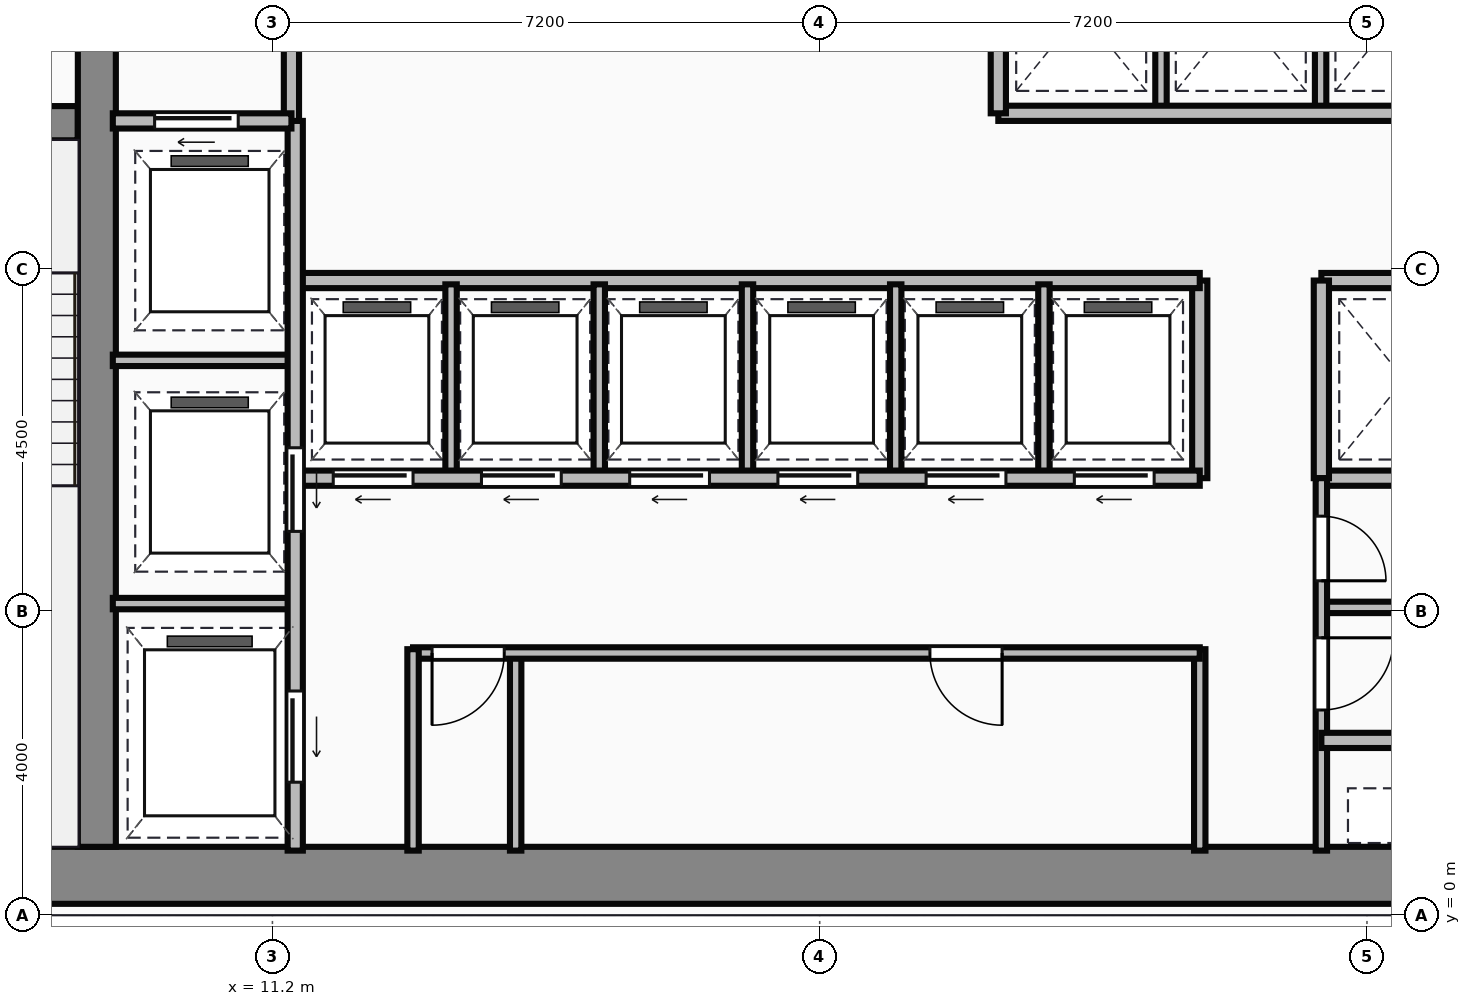
"""IFC4 building model, lengths in metres.
Left out: names, types, materials, properties, quantities, classifications, styles, units other than length and angle.
Written with IfcOpenShell. Run it as: python <this file> out.ifc"""

import sys

from ifc_helpers import new_model, si_unit, direction, frame, frame_2d, origin, place, context, subcontext, project, spatial, rectangle, extrude, source, transform, mapped, element, fill, save


model = new_model("IFC4")
c1 = context("Model", 3, precision=1e-05, world=origin(), true_north=direction((0.0, 1.0)))
c2 = subcontext(c1, "Body", "Model", "MODEL_VIEW")
j1 = project(units=[si_unit("LENGTHUNIT", "METRE"), si_unit("PLANEANGLEUNIT", "RADIAN")], contexts=[c1])
p1 = place(None, origin())
s1 = spatial("IfcSite", under=j1, at=p1, CompositionType="ELEMENT")
p2 = place(p1, origin())
s2 = spatial("IfcBuilding", under=s1, at=p2, CompositionType="ELEMENT")
p3 = place(p2, frame((0.0, 0.0, 151.55)))
s3 = spatial("IfcBuildingStorey", under=s2, at=p3, CompositionType="ELEMENT", Elevation=151.55)
m1 = source(origin(), c2, "Body", "SweptSolid", [
    extrude(rectangle(XDim=29.5, YDim=0.75, at=frame_2d((14.75, 0.0))), origin(), (0.0, 0.0, 1.0), 3.65),
])
p4 = place(p3, frame((4.5, 0.525, 0.0), z_axis=(0.0, 0.0, 1.0), x_axis=(1.0, 0.0, 0.0)))
e1 = element("IfcWall", 1, at=p4, inside=s3, PredefinedType="SHEAR", context=c2, shape_type="MappedRepresentation", body=[
    mapped(m1, transform((0.0, 0.0, 0.0))),
])
m2 = source(origin(), c2, "Body", "SweptSolid", [
    extrude(rectangle(XDim=12.35, YDim=0.5, at=frame_2d((6.175, 0.0))), origin(), (0.0, 0.0, 1.0), 3.65),
])
p5 = place(p3, frame((8.89, 0.9, 0.0), z_axis=(0.0, 0.0, 1.0), x_axis=(0.0, 1.0, 0.0)))
e2 = element("IfcWall", 2, at=p5, inside=s3, PredefinedType="SHEAR", context=c2, shape_type="MappedRepresentation", body=[
    mapped(m2, transform((0.0, 0.0, 0.0))),
])
m3 = source(origin(), c2, "Body", "SweptSolid", [
    extrude(rectangle(XDim=3.39, YDim=0.45, at=frame_2d((1.695, 0.0))), origin(), (0.0, 0.0, 1.0), 3.65),
])
p6 = place(p3, frame((5.25, 10.42, 0.0), z_axis=(0.0, 0.0, 1.0), x_axis=(1.0, 0.0, 0.0)))
e3 = element("IfcWall", 3, at=p6, inside=s3, PredefinedType="SHEAR", context=c2, shape_type="MappedRepresentation", body=[
    mapped(m3, transform((0.0, 0.0, 0.0))),
])
p7 = place(p6, frame((1.05, 0.0, 0.0)))
e4 = element("IfcOpeningElement", 4, at=p7, cuts=e3, PredefinedType="OPENING", context=c2, shape_type="SweptSolid", body=[
    extrude(rectangle(XDim=1.1, YDim=2.15, at=frame_2d((0.55, 1.075))), frame((0.0, 0.235, 0.0), z_axis=(0.0, -1.0, 0.0), x_axis=(1.0, 0.0, 0.0)), (0.0, 0.0, 1.0), 0.47),
])
m4 = source(origin(), c2, "Body", "SweptSolid", [
    extrude(rectangle(XDim=3.18, YDim=0.2, at=frame_2d((1.59, 0.0))), origin(), (0.0, 0.0, 1.0), 3.4),
])
p8 = place(p3, frame((11.45, 10.42, 0.0), z_axis=(0.0, 0.0, 1.0), x_axis=(0.0, 1.0, 0.0)))
e5 = element("IfcWall", 5, at=p8, inside=s3, PredefinedType="PARTITIONING", context=c2, shape_type="MappedRepresentation", body=[
    mapped(m4, transform((0.0, 0.0, 0.0))),
])
m5 = source(origin(), c2, "Body", "SweptSolid", [
    extrude(rectangle(XDim=2.35, YDim=0.2, at=frame_2d((1.175, 0.0))), origin(), (0.0, 0.0, 1.0), 3.4),
])
p9 = place(p3, frame((9.1, 10.45, 0.0), z_axis=(0.0, 0.0, 1.0), x_axis=(1.0, 0.0, 0.0)))
e6 = element("IfcWall", 6, at=p9, inside=s3, PredefinedType="PARTITIONING", context=c2, shape_type="MappedRepresentation", body=[
    mapped(m5, transform((0.0, 0.0, 0.0))),
])
p10 = place(p9, frame((0.55, 0.0, 0.0)))
e7 = element("IfcOpeningElement", 7, at=p10, cuts=e6, PredefinedType="OPENING", context=c2, shape_type="SweptSolid", body=[
    extrude(rectangle(XDim=1.1, YDim=2.15, at=frame_2d((0.55, 1.075))), frame((0.0, 0.11, 0.0), z_axis=(0.0, -1.0, 0.0), x_axis=(1.0, 0.0, 0.0)), (0.0, 0.0, 1.0), 0.22),
])
m6 = source(origin(), c2, "Body", "SweptSolid", [
    extrude(rectangle(XDim=9.6, YDim=0.2, at=frame_2d((4.8, 0.0))), origin(), (0.0, 0.0, 1.0), 3.4),
])
p11 = place(p3, frame((11.5, 0.85, 0.0), z_axis=(0.0, 0.0, 1.0), x_axis=(0.0, 1.0, 0.0)))
e8 = element("IfcWall", 8, at=p11, inside=s3, PredefinedType="PARTITIONING", context=c2, shape_type="MappedRepresentation", body=[
    mapped(m6, transform((0.0, 0.0, 0.0))),
])
p12 = place(p11, frame((4.2, 0.0, 0.0)))
e9 = element("IfcOpeningElement", 9, at=p12, cuts=e8, PredefinedType="OPENING", context=c2, shape_type="SweptSolid", body=[
    extrude(rectangle(XDim=1.1, YDim=2.15, at=frame_2d((0.55, 1.075))), frame((0.0, 0.11, 0.0), z_axis=(0.0, -1.0, 0.0), x_axis=(1.0, 0.0, 0.0)), (0.0, 0.0, 1.0), 0.22),
])
p13 = place(p11, frame((0.9, 0.0, 0.0)))
e10 = element("IfcOpeningElement", 10, at=p13, cuts=e8, PredefinedType="OPENING", context=c2, shape_type="SweptSolid", body=[
    extrude(rectangle(XDim=1.2, YDim=2.15, at=frame_2d((0.6, 1.075))), frame((0.0, 0.11, 0.0), z_axis=(0.0, -1.0, 0.0), x_axis=(1.0, 0.0, 0.0)), (0.0, 0.0, 1.0), 0.22),
])
m7 = source(origin(), c2, "Body", "SweptSolid", [
    extrude(rectangle(XDim=2.4, YDim=0.15, at=frame_2d((1.2, 0.0))), origin(), (0.0, 0.0, 1.0), 3.4),
])
for number, where, z_axis, x_axis in (
    (11, (9.1, 4.1, 0.0), (0.0, 0.0, 1.0), (1.0, 0.0, 0.0)),
    (12, (9.1, 7.3, 0.0), (0.0, 0.0, 1.0), (1.0, 0.0, 0.0)),
):
    element("IfcWall", number, at=place(p3, frame(where, z_axis=z_axis, x_axis=x_axis)), inside=s3, PredefinedType="PARTITIONING", context=c2, shape_type="MappedRepresentation", body=[
        mapped(m7, transform((0.0, 0.0, 0.0))),
    ])
m8 = source(origin(), c2, "Body", "SweptSolid", [
    extrude(rectangle(XDim=2.65, YDim=0.15, at=frame_2d((1.325, 0.0))), origin(), (0.0, 0.0, 1.0), 3.4),
])
p14 = place(p3, frame((13.05, 0.85, 0.0), z_axis=(0.0, 0.0, 1.0), x_axis=(0.0, 1.0, 0.0)))
e13 = element("IfcWall", 13, at=p14, inside=s3, PredefinedType="PARTITIONING", context=c2, shape_type="MappedRepresentation", body=[
    mapped(m8, transform((0.0, 0.0, 0.0))),
])
m9 = source(origin(), c2, "Body", "SweptSolid", [
    extrude(rectangle(XDim=10.35, YDim=0.15, at=frame_2d((5.175, 0.0))), origin(), (0.0, 0.0, 1.0), 3.4),
])
p15 = place(p3, frame((13.05, 3.45, 0.0), z_axis=(0.0, 0.0, 1.0), x_axis=(1.0, 0.0, 0.0)))
e14 = element("IfcWall", 14, at=p15, inside=s3, PredefinedType="PARTITIONING", context=c2, shape_type="MappedRepresentation", body=[
    mapped(m9, transform((0.0, 0.0, 0.0))),
])
p16 = place(p15, frame((0.25, 0.0, 0.0)))
e15 = element("IfcOpeningElement", 15, at=p16, cuts=e14, PredefinedType="OPENING", context=c2, shape_type="SweptSolid", body=[
    extrude(rectangle(XDim=0.95, YDim=2.15, at=frame_2d((0.475, 1.075))), frame((0.0, 0.085, 0.0), z_axis=(0.0, -1.0, 0.0), x_axis=(1.0, 0.0, 0.0)), (0.0, 0.0, 1.0), 0.17),
])
p17 = place(p15, frame((6.8, 0.0, 0.0)))
e16 = element("IfcOpeningElement", 16, at=p17, cuts=e14, PredefinedType="OPENING", context=c2, shape_type="SweptSolid", body=[
    extrude(rectangle(XDim=0.95, YDim=2.15, at=frame_2d((0.475, 1.075))), frame((0.0, 0.085, 0.0), z_axis=(0.0, -1.0, 0.0), x_axis=(1.0, 0.0, 0.0)), (0.0, 0.0, 1.0), 0.17),
])
p18 = place(p3, frame((23.4, 0.85, 0.0), z_axis=(0.0, 0.0, 1.0), x_axis=(0.0, 1.0, 0.0)))
e17 = element("IfcWall", 17, at=p18, inside=s3, PredefinedType="PARTITIONING", context=c2, shape_type="MappedRepresentation", body=[
    mapped(m8, transform((0.0, 0.0, 0.0))),
])
m10 = source(origin(), c2, "Body", "SweptSolid", [
    extrude(rectangle(XDim=2.6, YDim=0.15, at=frame_2d((1.3, 0.0))), origin(), (0.0, 0.0, 1.0), 3.4),
])
p19 = place(p3, frame((14.4, 0.85, 0.0), z_axis=(0.0, 0.0, 1.0), x_axis=(0.0, 1.0, 0.0)))
e18 = element("IfcWall", 18, at=p19, inside=s3, PredefinedType="PARTITIONING", context=c2, shape_type="MappedRepresentation", body=[
    mapped(m10, transform((0.0, 0.0, 0.0))),
])
m11 = source(origin(), c2, "Body", "SweptSolid", [
    extrude(rectangle(XDim=11.85, YDim=0.2, at=frame_2d((5.925, 0.0))), origin(), (0.0, 0.0, 1.0), 3.4),
])
p20 = place(p3, frame((11.55, 5.75, 0.0), z_axis=(0.0, 0.0, 1.0), x_axis=(1.0, 0.0, 0.0)))
e19 = element("IfcWall", 19, at=p20, inside=s3, PredefinedType="PARTITIONING", context=c2, shape_type="MappedRepresentation", body=[
    mapped(m11, transform((0.0, 0.0, 0.0))),
])
p21 = place(p20, frame((0.45, 0.0, 0.0)))
e20 = element("IfcOpeningElement", 20, at=p21, cuts=e19, PredefinedType="OPENING", context=c2, shape_type="SweptSolid", body=[
    extrude(rectangle(XDim=1.05, YDim=2.15, at=frame_2d((0.525, 1.075))), frame((0.0, 0.11, 0.0), z_axis=(0.0, -1.0, 0.0), x_axis=(1.0, 0.0, 0.0)), (0.0, 0.0, 1.0), 0.22),
])
p22 = place(p20, frame((2.4, 0.0, 0.0)))
e21 = element("IfcOpeningElement", 21, at=p22, cuts=e19, PredefinedType="OPENING", context=c2, shape_type="SweptSolid", body=[
    extrude(rectangle(XDim=1.05, YDim=2.15, at=frame_2d((0.525, 1.075))), frame((0.0, 0.11, 0.0), z_axis=(0.0, -1.0, 0.0), x_axis=(1.0, 0.0, 0.0)), (0.0, 0.0, 1.0), 0.22),
])
p23 = place(p20, frame((4.35, 0.0, 0.0)))
e22 = element("IfcOpeningElement", 22, at=p23, cuts=e19, PredefinedType="OPENING", context=c2, shape_type="SweptSolid", body=[
    extrude(rectangle(XDim=1.05, YDim=2.15, at=frame_2d((0.525, 1.075))), frame((0.0, 0.11, 0.0), z_axis=(0.0, -1.0, 0.0), x_axis=(1.0, 0.0, 0.0)), (0.0, 0.0, 1.0), 0.22),
])
p24 = place(p20, frame((6.3, 0.0, 0.0)))
e23 = element("IfcOpeningElement", 23, at=p24, cuts=e19, PredefinedType="OPENING", context=c2, shape_type="SweptSolid", body=[
    extrude(rectangle(XDim=1.05, YDim=2.15, at=frame_2d((0.525, 1.075))), frame((0.0, 0.11, 0.0), z_axis=(0.0, -1.0, 0.0), x_axis=(1.0, 0.0, 0.0)), (0.0, 0.0, 1.0), 0.22),
])
p25 = place(p20, frame((8.25, 0.0, 0.0)))
e24 = element("IfcOpeningElement", 24, at=p25, cuts=e19, PredefinedType="OPENING", context=c2, shape_type="SweptSolid", body=[
    extrude(rectangle(XDim=1.05, YDim=2.15, at=frame_2d((0.525, 1.075))), frame((0.0, 0.11, 0.0), z_axis=(0.0, -1.0, 0.0), x_axis=(1.0, 0.0, 0.0)), (0.0, 0.0, 1.0), 0.22),
])
p26 = place(p20, frame((10.2, 0.0, 0.0)))
e25 = element("IfcOpeningElement", 25, at=p26, cuts=e19, PredefinedType="OPENING", context=c2, shape_type="SweptSolid", body=[
    extrude(rectangle(XDim=1.05, YDim=2.15, at=frame_2d((0.525, 1.075))), frame((0.0, 0.11, 0.0), z_axis=(0.0, -1.0, 0.0), x_axis=(1.0, 0.0, 0.0)), (0.0, 0.0, 1.0), 0.22),
])
p27 = place(p3, frame((11.55, 8.35, 0.0), z_axis=(0.0, 0.0, 1.0), x_axis=(1.0, 0.0, 0.0)))
e26 = element("IfcWall", 26, at=p27, inside=s3, PredefinedType="PARTITIONING", context=c2, shape_type="MappedRepresentation", body=[
    mapped(m11, transform((0.0, 0.0, 0.0))),
])
m12 = source(origin(), c2, "Body", "SweptSolid", [
    extrude(rectangle(XDim=2.6, YDim=0.2, at=frame_2d((1.3, 0.0))), origin(), (0.0, 0.0, 1.0), 3.4),
])
p28 = place(p3, frame((23.4, 5.75, 0.0), z_axis=(0.0, 0.0, 1.0), x_axis=(0.0, 1.0, 0.0)))
e27 = element("IfcWall", 27, at=p28, inside=s3, PredefinedType="PARTITIONING", context=c2, shape_type="MappedRepresentation", body=[
    mapped(m12, transform((0.0, 0.0, 0.0))),
])
m13 = source(origin(), c2, "Body", "SweptSolid", [
    extrude(rectangle(XDim=2.5, YDim=0.15, at=frame_2d((1.25, 0.0))), origin(), (0.0, 0.0, 1.0), 3.4),
])
for number, where, z_axis, x_axis in (
    (28, (13.55, 5.8, 0.0), (0.0, 0.0, 1.0), (0.0, 1.0, 0.0)),
    (29, (15.5, 5.8, 0.0), (0.0, 0.0, 1.0), (0.0, 1.0, 0.0)),
    (30, (17.45, 5.8, 0.0), (0.0, 0.0, 1.0), (0.0, 1.0, 0.0)),
    (31, (19.4, 5.8, 0.0), (0.0, 0.0, 1.0), (0.0, 1.0, 0.0)),
    (32, (21.35, 5.8, 0.0), (0.0, 0.0, 1.0), (0.0, 1.0, 0.0)),
):
    element("IfcWall", number, at=place(p3, frame(where, z_axis=z_axis, x_axis=x_axis)), inside=s3, PredefinedType="PARTITIONING", context=c2, shape_type="MappedRepresentation", body=[
        mapped(m13, transform((0.0, 0.0, 0.0))),
    ])
m14 = source(origin(), c2, "Body", "SweptSolid", [
    extrude(rectangle(XDim=8.8, YDim=0.2, at=frame_2d((4.4, 0.0))), origin(), (0.0, 0.0, 1.0), 3.4),
])
p29 = place(p3, frame((20.75, 10.55, 0.0), z_axis=(0.0, 0.0, 1.0), x_axis=(1.0, 0.0, 0.0)))
e33 = element("IfcWall", 33, at=p29, inside=s3, PredefinedType="PARTITIONING", context=c2, shape_type="MappedRepresentation", body=[
    mapped(m14, transform((0.0, 0.0, 0.0))),
])
m15 = source(origin(), c2, "Body", "SweptSolid", [
    extrude(rectangle(XDim=3.0, YDim=0.2, at=frame_2d((1.5, 0.0))), origin(), (0.0, 0.0, 1.0), 3.4),
])
p30 = place(p3, frame((20.75, 10.55, 0.0), z_axis=(0.0, 0.0, 1.0), x_axis=(0.0, 1.0, 0.0)))
e34 = element("IfcWall", 34, at=p30, inside=s3, PredefinedType="PARTITIONING", context=c2, shape_type="MappedRepresentation", body=[
    mapped(m15, transform((0.0, 0.0, 0.0))),
])
m16 = source(origin(), c2, "Body", "SweptSolid", [
    extrude(rectangle(XDim=2.85, YDim=0.15, at=frame_2d((1.425, 0.0))), origin(), (0.0, 0.0, 1.0), 3.4),
])
for number, where, z_axis, x_axis in (
    (35, (22.89, 10.6, 0.0), (0.0, 0.0, 1.0), (0.0, 1.0, 0.0)),
    (36, (24.99, 10.6, 0.0), (0.0, 0.0, 1.0), (0.0, 1.0, 0.0)),
):
    element("IfcWall", number, at=place(p3, frame(where, z_axis=z_axis, x_axis=x_axis)), inside=s3, PredefinedType="PARTITIONING", context=c2, shape_type="MappedRepresentation", body=[
        mapped(m16, transform((0.0, 0.0, 0.0))),
    ])
m17 = source(origin(), c2, "Body", "SweptSolid", [
    extrude(rectangle(XDim=4.55, YDim=0.2, at=frame_2d((2.275, 0.0))), origin(), (0.0, 0.0, 1.0), 3.4),
])
for number, where, z_axis, x_axis in (
    (37, (25.0, 8.35, 0.0), (0.0, 0.0, 1.0), (1.0, 0.0, 0.0)),
    (38, (25.0, 5.75, 0.0), (0.0, 0.0, 1.0), (1.0, 0.0, 0.0)),
):
    element("IfcWall", number, at=place(p3, frame(where, z_axis=z_axis, x_axis=x_axis)), inside=s3, PredefinedType="PARTITIONING", context=c2, shape_type="MappedRepresentation", body=[
        mapped(m17, transform((0.0, 0.0, 0.0))),
    ])
p31 = place(p3, frame((25.0, 5.75, 0.0), z_axis=(0.0, 0.0, 1.0), x_axis=(0.0, 1.0, 0.0)))
e39 = element("IfcWall", 39, at=p31, inside=s3, PredefinedType="PARTITIONING", context=c2, shape_type="MappedRepresentation", body=[
    mapped(m12, transform((0.0, 0.0, 0.0))),
])
m18 = source(origin(), c2, "Body", "SweptSolid", [
    extrude(rectangle(XDim=4.9, YDim=0.15, at=frame_2d((2.45, 0.0))), origin(), (0.0, 0.0, 1.0), 3.4),
])
p32 = place(p3, frame((25.0, 0.85, 0.0), z_axis=(0.0, 0.0, 1.0), x_axis=(0.0, 1.0, 0.0)))
e40 = element("IfcWall", 40, at=p32, inside=s3, PredefinedType="PARTITIONING", context=c2, shape_type="MappedRepresentation", body=[
    mapped(m18, transform((0.0, 0.0, 0.0))),
])
p33 = place(p32, frame((1.85, 0.0, 0.0)))
e41 = element("IfcOpeningElement", 41, at=p33, cuts=e40, PredefinedType="OPENING", context=c2, shape_type="SweptSolid", body=[
    extrude(rectangle(XDim=0.95, YDim=2.15, at=frame_2d((0.475, 1.075))), frame((0.0, 0.085, 0.0), z_axis=(0.0, -1.0, 0.0), x_axis=(1.0, 0.0, 0.0)), (0.0, 0.0, 1.0), 0.17),
])
p34 = place(p32, frame((3.55, 0.0, 0.0)))
e42 = element("IfcOpeningElement", 42, at=p34, cuts=e40, PredefinedType="OPENING", context=c2, shape_type="SweptSolid", body=[
    extrude(rectangle(XDim=0.85, YDim=2.15, at=frame_2d((0.425, 1.075))), frame((0.0, 0.085, 0.0), z_axis=(0.0, -1.0, 0.0), x_axis=(1.0, 0.0, 0.0)), (0.0, 0.0, 1.0), 0.17),
])
m19 = source(origin(), c2, "Body", "SweptSolid", [
    extrude(rectangle(XDim=2.4, YDim=0.2, at=frame_2d((1.2, 0.0))), origin(), (0.0, 0.0, 1.0), 3.4),
])
p35 = place(p3, frame((25.0, 2.3, 0.0), z_axis=(0.0, 0.0, 1.0), x_axis=(1.0, 0.0, 0.0)))
e43 = element("IfcWall", 43, at=p35, inside=s3, PredefinedType="PARTITIONING", context=c2, shape_type="MappedRepresentation", body=[
    mapped(m19, transform((0.0, 0.0, 0.0))),
])
m20 = source(origin(), c2, "Body", "SweptSolid", [
    extrude(rectangle(XDim=4.55, YDim=0.15, at=frame_2d((2.275, 0.0))), origin(), (0.0, 0.0, 1.0), 3.4),
])
p36 = place(p3, frame((25.0, 4.05, 0.0), z_axis=(0.0, 0.0, 1.0), x_axis=(1.0, 0.0, 0.0)))
e44 = element("IfcWall", 44, at=p36, inside=s3, PredefinedType="PARTITIONING", context=c2, shape_type="MappedRepresentation", body=[
    mapped(m20, transform((0.0, 0.0, 0.0))),
])
m21 = source(origin(), c2, "Body", "SweptSolid", [
    extrude(rectangle(XDim=1.1, YDim=2.15, at=frame_2d((0.55, 1.075))), frame((0.0, 0.025, 0.0), z_axis=(0.0, -1.0, 0.0), x_axis=(1.0, 0.0, 0.0)), (0.0, 0.0, 1.0), 0.05),
])
p37 = place(p10, origin())
e45 = element("IfcDoor", 45, at=p37, inside=s3, OperationType="SLIDING_TO_LEFT", PredefinedType="DOOR", context=c2, shape_type="MappedRepresentation", body=[
    mapped(m21, transform((0.0, 0.0, 0.0))),
])
fill(e7, e45)
p38 = place(p12, frame((1.1, 0.0, 0.0), z_axis=(0.0, 0.0, 1.0), x_axis=(-1.0, 0.0, 0.0)))
e46 = element("IfcDoor", 46, at=p38, inside=s3, OperationType="SLIDING_TO_LEFT", PredefinedType="DOOR", context=c2, shape_type="MappedRepresentation", body=[
    mapped(m21, transform((0.0, 0.0, 0.0))),
])
fill(e9, e46)
m22 = source(origin(), c2, "Body", "SweptSolid", [
    extrude(rectangle(XDim=1.2, YDim=2.15, at=frame_2d((0.6, 1.075))), frame((0.0, 0.025, 0.0), z_axis=(0.0, -1.0, 0.0), x_axis=(1.0, 0.0, 0.0)), (0.0, 0.0, 1.0), 0.05),
])
p39 = place(p13, frame((1.2, 0.0, 0.0), z_axis=(0.0, 0.0, 1.0), x_axis=(-1.0, 0.0, 0.0)))
e47 = element("IfcDoor", 47, at=p39, inside=s3, OperationType="SLIDING_TO_LEFT", PredefinedType="DOOR", context=c2, shape_type="MappedRepresentation", body=[
    mapped(m22, transform((0.0, 0.0, 0.0))),
])
fill(e10, e47)
m23 = source(origin(), c2, "Body", "SweptSolid", [
    extrude(rectangle(XDim=0.95, YDim=2.15, at=frame_2d((0.475, 1.075))), frame((0.0, 0.025, 0.0), z_axis=(0.0, -1.0, 0.0), x_axis=(1.0, 0.0, 0.0)), (0.0, 0.0, 1.0), 0.05),
])
p40 = place(p16, origin())
e48 = element("IfcDoor", 48, at=p40, inside=s3, OperationType="SINGLE_SWING_LEFT", PredefinedType="DOOR", context=c2, shape_type="MappedRepresentation", body=[
    mapped(m23, transform((0.0, 0.0, 0.0))),
])
fill(e15, e48)
p41 = place(p17, origin())
e49 = element("IfcDoor", 49, at=p41, inside=s3, OperationType="SINGLE_SWING_RIGHT", PredefinedType="DOOR", context=c2, shape_type="MappedRepresentation", body=[
    mapped(m23, transform((0.0, 0.0, 0.0))),
])
fill(e16, e49)
m24 = source(origin(), c2, "Body", "SweptSolid", [
    extrude(rectangle(XDim=1.05, YDim=2.15, at=frame_2d((0.525, 1.075))), frame((0.0, 0.025, 0.0), z_axis=(0.0, -1.0, 0.0), x_axis=(1.0, 0.0, 0.0)), (0.0, 0.0, 1.0), 0.05),
])
p42 = place(p21, frame((1.05, 0.0, 0.0), z_axis=(0.0, 0.0, 1.0), x_axis=(-1.0, 0.0, 0.0)))
e50 = element("IfcDoor", 50, at=p42, inside=s3, OperationType="SLIDING_TO_LEFT", PredefinedType="DOOR", context=c2, shape_type="MappedRepresentation", body=[
    mapped(m24, transform((0.0, 0.0, 0.0))),
])
fill(e20, e50)
p43 = place(p22, frame((1.05, 0.0, 0.0), z_axis=(0.0, 0.0, 1.0), x_axis=(-1.0, 0.0, 0.0)))
e51 = element("IfcDoor", 51, at=p43, inside=s3, OperationType="SLIDING_TO_LEFT", PredefinedType="DOOR", context=c2, shape_type="MappedRepresentation", body=[
    mapped(m24, transform((0.0, 0.0, 0.0))),
])
fill(e21, e51)
p44 = place(p23, frame((1.05, 0.0, 0.0), z_axis=(0.0, 0.0, 1.0), x_axis=(-1.0, 0.0, 0.0)))
e52 = element("IfcDoor", 52, at=p44, inside=s3, OperationType="SLIDING_TO_LEFT", PredefinedType="DOOR", context=c2, shape_type="MappedRepresentation", body=[
    mapped(m24, transform((0.0, 0.0, 0.0))),
])
fill(e22, e52)
p45 = place(p24, frame((1.05, 0.0, 0.0), z_axis=(0.0, 0.0, 1.0), x_axis=(-1.0, 0.0, 0.0)))
e53 = element("IfcDoor", 53, at=p45, inside=s3, OperationType="SLIDING_TO_LEFT", PredefinedType="DOOR", context=c2, shape_type="MappedRepresentation", body=[
    mapped(m24, transform((0.0, 0.0, 0.0))),
])
fill(e23, e53)
p46 = place(p25, frame((1.05, 0.0, 0.0), z_axis=(0.0, 0.0, 1.0), x_axis=(-1.0, 0.0, 0.0)))
e54 = element("IfcDoor", 54, at=p46, inside=s3, OperationType="SLIDING_TO_LEFT", PredefinedType="DOOR", context=c2, shape_type="MappedRepresentation", body=[
    mapped(m24, transform((0.0, 0.0, 0.0))),
])
fill(e24, e54)
p47 = place(p26, frame((1.05, 0.0, 0.0), z_axis=(0.0, 0.0, 1.0), x_axis=(-1.0, 0.0, 0.0)))
e55 = element("IfcDoor", 55, at=p47, inside=s3, OperationType="SLIDING_TO_LEFT", PredefinedType="DOOR", context=c2, shape_type="MappedRepresentation", body=[
    mapped(m24, transform((0.0, 0.0, 0.0))),
])
fill(e25, e55)
p48 = place(p33, origin())
e56 = element("IfcDoor", 56, at=p48, inside=s3, OperationType="SINGLE_SWING_RIGHT", PredefinedType="DOOR", context=c2, shape_type="MappedRepresentation", body=[
    mapped(m23, transform((0.0, 0.0, 0.0))),
])
fill(e41, e56)
m25 = source(origin(), c2, "Body", "SweptSolid", [
    extrude(rectangle(XDim=0.85, YDim=2.15, at=frame_2d((0.425, 1.075))), frame((0.0, 0.025, 0.0), z_axis=(0.0, -1.0, 0.0), x_axis=(1.0, 0.0, 0.0)), (0.0, 0.0, 1.0), 0.05),
])
p49 = place(p34, origin())
e57 = element("IfcDoor", 57, at=p49, inside=s3, OperationType="SINGLE_SWING_LEFT", PredefinedType="DOOR", context=c2, shape_type="MappedRepresentation", body=[
    mapped(m25, transform((0.0, 0.0, 0.0))),
])
fill(e42, e57)
save(model, sys.argv[1])
